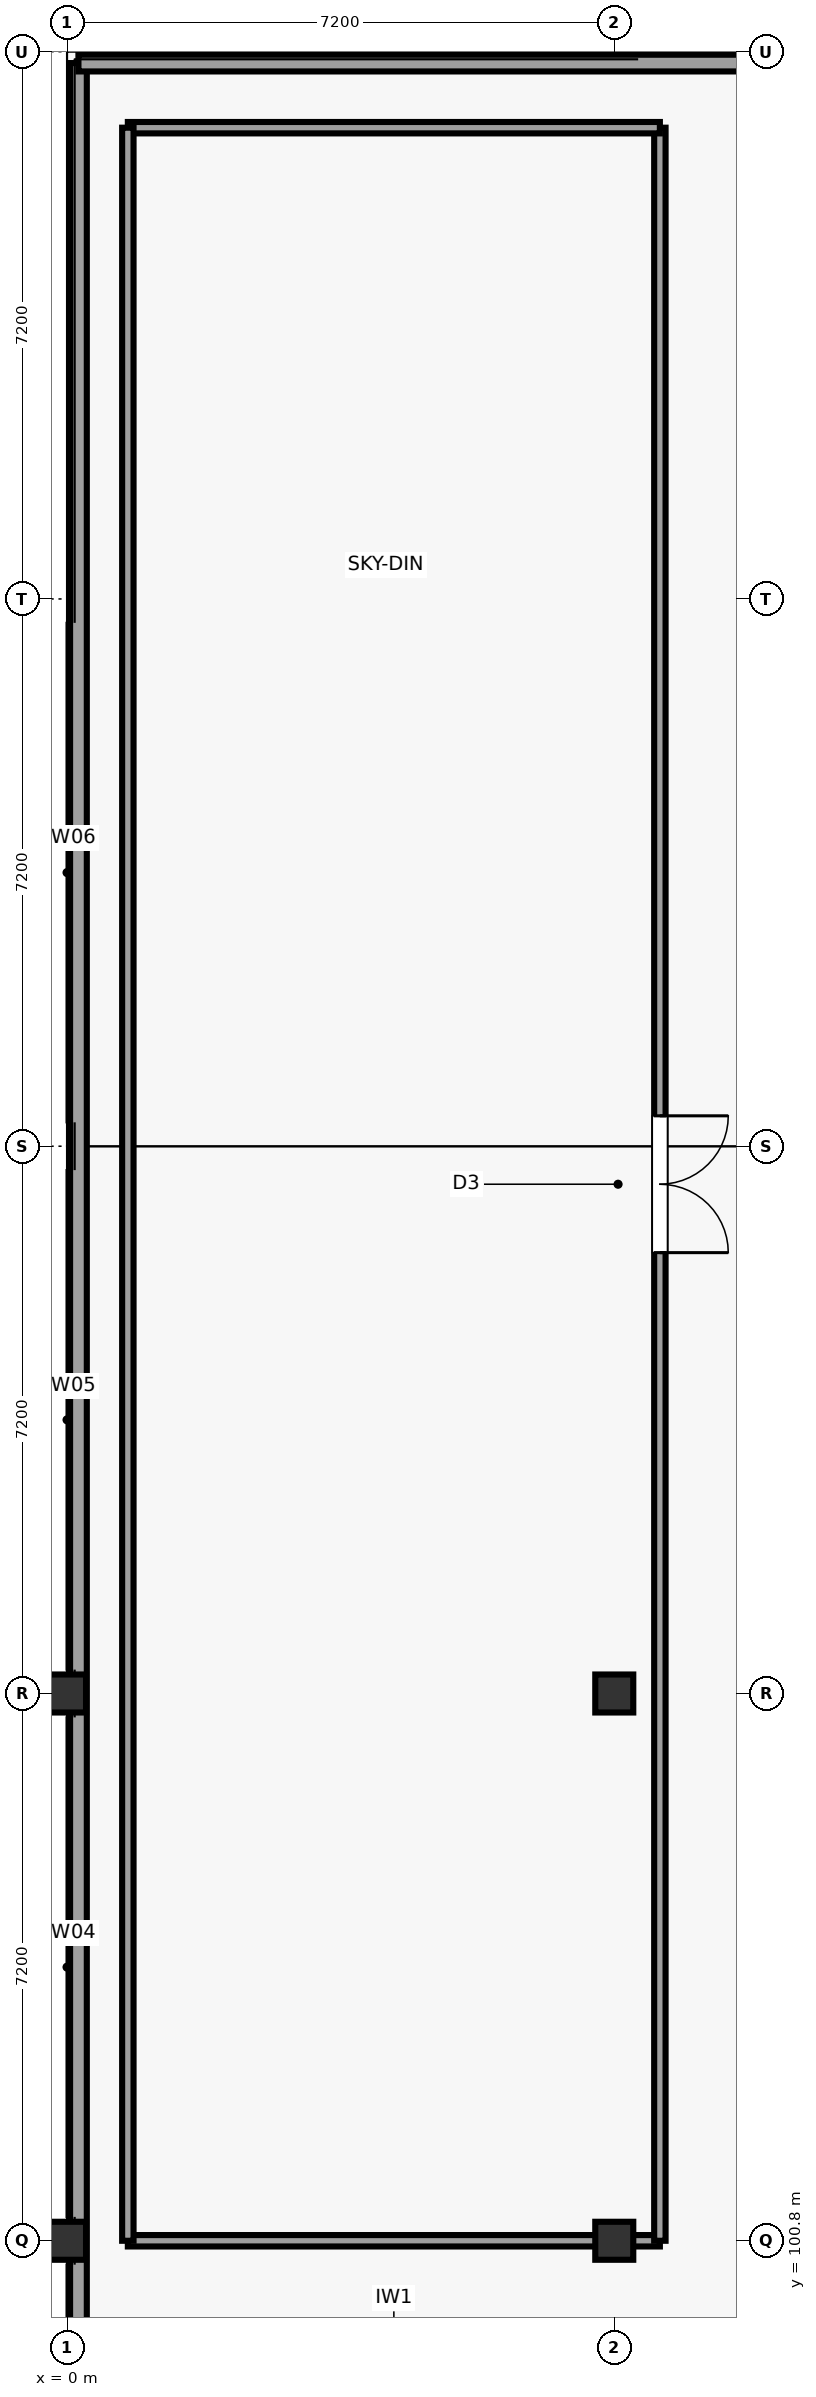
"""IFC4 building model, lengths in metres.
Left out: names, types, materials, properties, quantities, classifications, styles, units other than length and angle.
Written with IfcOpenShell. Run it as: python <this file> out.ifc"""

import sys

from ifc_helpers import new_model, si_unit, direction, frame, frame_2d, origin, origin_2d, place, context, subcontext, project, spatial, rectangle, extrude, element, fill, save


model = new_model("IFC4")
c1 = context("Model", 3, precision=1e-05, world=origin(), true_north=direction((0.0, 1.0)))
c2 = subcontext(c1, "Body", "Model", "MODEL_VIEW")
j1 = project(units=[si_unit("LENGTHUNIT", "METRE"), si_unit("PLANEANGLEUNIT", "RADIAN")], contexts=[c1])
p1 = place(None, origin())
s1 = spatial("IfcSite", under=j1, at=p1, CompositionType="ELEMENT")
p2 = place(p1, origin())
s2 = spatial("IfcBuilding", under=s1, at=p2, CompositionType="ELEMENT")
p3 = place(p2, frame((0.0, 0.0, 23.0)))
s3 = spatial("IfcBuildingStorey", under=s2, at=p3, CompositionType="ELEMENT", Elevation=23.0)
for number, where, z_axis, x_axis in (
    (1, (0.0, 100.8, 0.0), (0.0, 0.0, 1.0), (1.0, 0.0, 0.0)),
    (2, (0.0, 108.0, 0.0), (0.0, 0.0, 1.0), (1.0, 0.0, 0.0)),
    (3, (7.2, 100.8, 0.0), (0.0, 0.0, 1.0), (1.0, 0.0, 0.0)),
    (4, (7.2, 108.0, 0.0), (0.0, 0.0, 1.0), (1.0, 0.0, 0.0)),
):
    element("IfcColumn", number, at=place(p3, frame(where, z_axis=z_axis, x_axis=x_axis)), inside=s3, PredefinedType="COLUMN", context=c2, shape_type="SweptSolid", body=[
        extrude(rectangle(XDim=0.5, YDim=0.5, at=origin_2d()), origin(), (0.0, 0.0, 1.0), 4.5),
    ])
p4 = place(p3, frame((0.15, 0.15, 4.5), z_axis=(0.0, 0.0, 1.0), x_axis=(0.0, 1.0, 0.0)))
e5 = element("IfcWall", 5, at=p4, inside=s3, PredefinedType="PARAPET", context=c2, shape_type="SweptSolid", body=[
    extrude(rectangle(XDim=129.3, YDim=0.22, at=frame_2d((64.65, 0.0))), origin(), (0.0, 0.0, 1.0), 1.15),
])
p5 = place(p3, frame((0.15, 129.45, 4.5), z_axis=(0.0, 0.0, 1.0), x_axis=(1.0, 0.0, 0.0)))
e6 = element("IfcWall", 6, at=p5, inside=s3, PredefinedType="PARAPET", context=c2, shape_type="SweptSolid", body=[
    extrude(rectangle(XDim=93.3, YDim=0.22, at=frame_2d((46.65, 0.0))), origin(), (0.0, 0.0, 1.0), 1.15),
])
p6 = place(p3, frame((0.8, 100.8, 0.0), z_axis=(0.0, 0.0, 1.0), x_axis=(1.0, 0.0, 0.0)))
e7 = element("IfcWall", 7, at=p6, inside=s3, PredefinedType="PARTITIONING", context=c2, shape_type="SweptSolid", body=[
    extrude(rectangle(XDim=7.0, YDim=0.15, at=frame_2d((3.5, 0.0))), origin(), (0.0, 0.0, 1.0), 3.34),
])
p7 = place(p3, frame((7.8, 100.8, 0.0), z_axis=(0.0, 0.0, 1.0), x_axis=(0.0, 1.0, 0.0)))
e8 = element("IfcWall", 8, at=p7, inside=s3, PredefinedType="PARTITIONING", context=c2, shape_type="SweptSolid", body=[
    extrude(rectangle(XDim=27.8, YDim=0.15, at=frame_2d((13.9, 0.0))), origin(), (0.0, 0.0, 1.0), 3.34),
])
p8 = place(p7, frame((13.0, 0.0, 0.0)))
e9 = element("IfcOpeningElement", 9, at=p8, cuts=e8, PredefinedType="OPENING", context=c2, shape_type="SweptSolid", body=[
    extrude(rectangle(XDim=1.8, YDim=2.3, at=frame_2d((0.9, 1.15))), frame((0.0, 0.085, 0.0), z_axis=(0.0, -1.0, 0.0), x_axis=(1.0, 0.0, 0.0)), (0.0, 0.0, 1.0), 0.17),
])
p9 = place(p3, frame((7.8, 128.6, 0.0), z_axis=(0.0, 0.0, 1.0), x_axis=(-1.0, 0.0, 0.0)))
e10 = element("IfcWall", 10, at=p9, inside=s3, PredefinedType="PARTITIONING", context=c2, shape_type="SweptSolid", body=[
    extrude(rectangle(XDim=7.0, YDim=0.15, at=frame_2d((3.5, 0.0))), origin(), (0.0, 0.0, 1.0), 3.34),
])
p10 = place(p3, frame((0.8, 128.6, 0.0), z_axis=(0.0, 0.0, 1.0), x_axis=(0.0, -1.0, 0.0)))
e11 = element("IfcWall", 11, at=p10, inside=s3, PredefinedType="PARTITIONING", context=c2, shape_type="SweptSolid", body=[
    extrude(rectangle(XDim=27.8, YDim=0.15, at=frame_2d((13.9, 0.0))), origin(), (0.0, 0.0, 1.0), 3.34),
])
p11 = place(p8, frame((1.8, 0.0, 0.0), z_axis=(0.0, 0.0, 1.0), x_axis=(-1.0, 0.0, 0.0)))
e12 = element("IfcDoor", 12, at=p11, inside=s3, OperationType="DOUBLE_DOOR_SINGLE_SWING", PredefinedType="DOOR", context=c2, shape_type="SweptSolid", body=[
    extrude(rectangle(XDim=1.8, YDim=2.3, at=frame_2d((0.9, 1.15))), frame((0.0, 0.025, 0.0), z_axis=(0.0, -1.0, 0.0), x_axis=(1.0, 0.0, 0.0)), (0.0, 0.0, 1.0), 0.05),
])
fill(e9, e12)
save(model, sys.argv[1])
